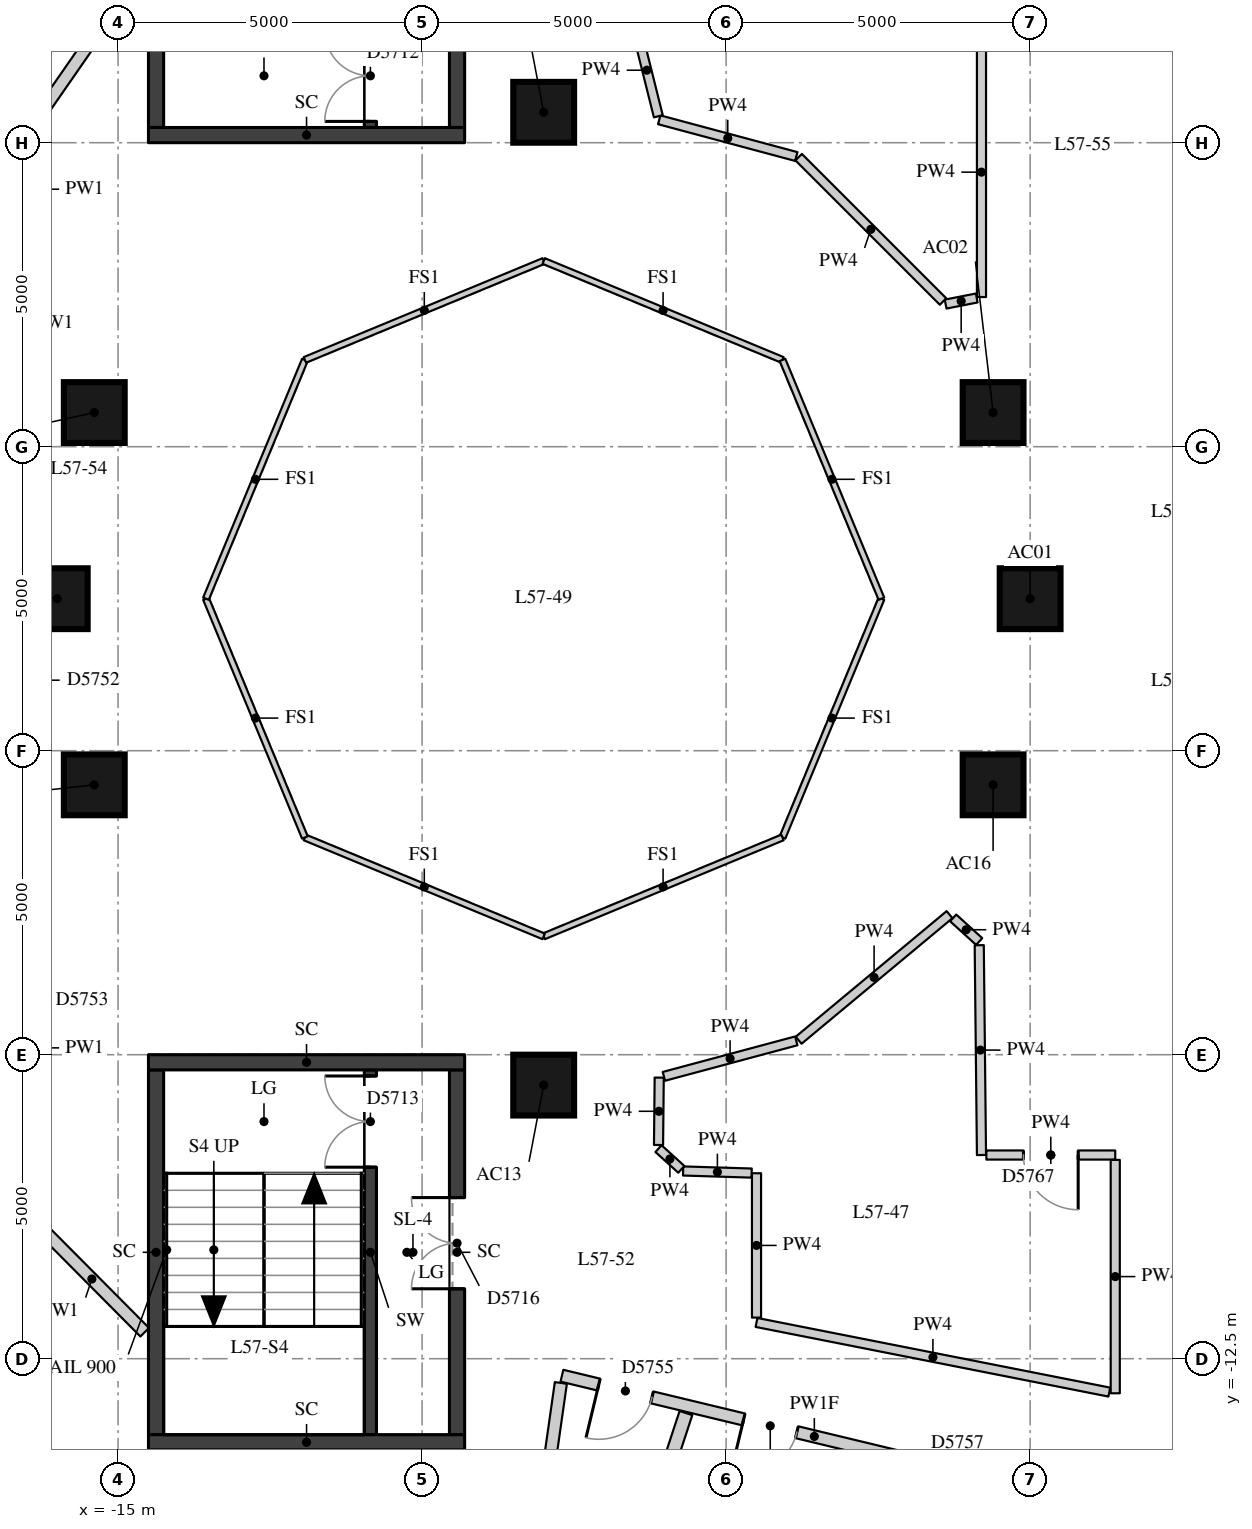
"""IFC4 building model, lengths in metres.
Left out: names, types, materials, properties, quantities, classifications, styles, units other than length and angle.
Written with IfcOpenShell. Run it as: python <this file> out.ifc"""

import sys

from ifc_helpers import new_model, si_unit, direction, frame, frame_2d, origin, origin_2d, place, context, subcontext, project, spatial, rectangle, extrude, element, fill, save


model = new_model("IFC4")
c1 = context("Model", 3, precision=1e-05, world=origin(), true_north=direction((0.0, 1.0)))
c2 = subcontext(c1, "Body", "Model", "MODEL_VIEW")
j1 = project(units=[si_unit("LENGTHUNIT", "METRE"), si_unit("PLANEANGLEUNIT", "RADIAN")], contexts=[c1])
p1 = place(None, origin())
s1 = spatial("IfcSite", under=j1, at=p1, CompositionType="ELEMENT")
p2 = place(p1, origin())
s2 = spatial("IfcBuilding", under=s1, at=p2, CompositionType="ELEMENT")
p3 = place(p2, frame((0.0, 0.0, 202.4)))
s3 = spatial("IfcBuildingStorey", under=s2, at=p3, CompositionType="ELEMENT", Elevation=202.4)
for number, where, z_axis, x_axis in (
    (1, (0.0, 0.0, 0.0), (0.0, 0.0, 1.0), (1.0, 0.0, 0.0)),
    (2, (-0.609, 3.062, 0.0), (0.0, 0.0, 1.0), (1.0, 0.0, 0.0)),
    (3, (-8.0, 8.0, 0.0), (0.0, 0.0, 1.0), (1.0, 0.0, 0.0)),
    (4, (-15.391, 3.062, 0.0), (0.0, 0.0, 1.0), (1.0, 0.0, 0.0)),
    (5, (-16.0, 0.0, 0.0), (0.0, 0.0, 1.0), (1.0, 0.0, 0.0)),
    (6, (-15.391, -3.062, 0.0), (0.0, 0.0, 1.0), (1.0, 0.0, 0.0)),
    (7, (-8.0, -8.0, 0.0), (0.0, 0.0, 1.0), (1.0, 0.0, 0.0)),
    (8, (-0.609, -3.062, 0.0), (0.0, 0.0, 1.0), (1.0, 0.0, 0.0)),
):
    element("IfcColumn", number, at=place(p3, frame(where, z_axis=z_axis, x_axis=x_axis)), inside=s3, PredefinedType="COLUMN", context=c2, shape_type="SweptSolid", body=[
        extrude(rectangle(XDim=1.0, YDim=1.0, at=origin_2d()), origin(), (0.0, 0.0, 1.0), 3.3),
    ])
p4 = place(p3, frame((-10.85, 7.75, 0.0), z_axis=(0.0, 0.0, 1.0), x_axis=(0.0, 1.0, 0.0)))
e9 = element("IfcWall", 9, at=p4, inside=s3, PredefinedType="SHEAR", context=c2, shape_type="SweptSolid", body=[
    extrude(rectangle(XDim=6.0, YDim=0.2, at=frame_2d((3.0, 0.0))), origin(), (0.0, 0.0, 1.0), 3.02),
])
p5 = place(p4, frame((0.1, 0.0, 0.0)))
e10 = element("IfcOpeningElement", 10, at=p5, cuts=e9, PredefinedType="OPENING", context=c2, shape_type="SweptSolid", body=[
    extrude(rectangle(XDim=1.5, YDim=2.1, at=frame_2d((0.75, 1.05))), frame((0.0, 0.11, 0.0), z_axis=(0.0, -1.0, 0.0), x_axis=(1.0, 0.0, 0.0)), (0.0, 0.0, 1.0), 0.22),
])
p6 = place(p3, frame((-10.85, -13.75, 0.0), z_axis=(0.0, 0.0, 1.0), x_axis=(0.0, 1.0, 0.0)))
e11 = element("IfcWall", 11, at=p6, inside=s3, PredefinedType="SHEAR", context=c2, shape_type="SweptSolid", body=[
    extrude(rectangle(XDim=6.0, YDim=0.2, at=frame_2d((3.0, 0.0))), origin(), (0.0, 0.0, 1.0), 3.02),
])
p7 = place(p6, frame((4.4, 0.0, 0.0)))
e12 = element("IfcOpeningElement", 12, at=p7, cuts=e11, PredefinedType="OPENING", context=c2, shape_type="SweptSolid", body=[
    extrude(rectangle(XDim=1.5, YDim=2.1, at=frame_2d((0.75, 1.05))), frame((0.0, 0.11, 0.0), z_axis=(0.0, -1.0, 0.0), x_axis=(1.0, 0.0, 0.0)), (0.0, 0.0, 1.0), 0.22),
])
p8 = place(p3, frame((-14.375, 7.75, -0.28), z_axis=(0.0, 0.0, 1.0), x_axis=(0.0, 1.0, 0.0)))
e13 = element("IfcWall", 13, at=p8, inside=s3, PredefinedType="SHEAR", context=c2, shape_type="SweptSolid", body=[
    extrude(rectangle(XDim=6.0, YDim=0.25, at=frame_2d((3.0, 0.0))), origin(), (0.0, 0.0, 1.0), 3.3),
])
p9 = place(p3, frame((-9.425, 7.75, -0.28), z_axis=(0.0, 0.0, 1.0), x_axis=(0.0, 1.0, 0.0)))
e14 = element("IfcWall", 14, at=p9, inside=s3, PredefinedType="SHEAR", context=c2, shape_type="SweptSolid", body=[
    extrude(rectangle(XDim=6.0, YDim=0.25, at=frame_2d((3.0, 0.0))), origin(), (0.0, 0.0, 1.0), 3.3),
])
p10 = place(p9, frame((2.1, 0.0, 0.28)))
e15 = element("IfcOpeningElement", 15, at=p10, cuts=e14, PredefinedType="OPENING", context=c2, shape_type="SweptSolid", body=[
    extrude(rectangle(XDim=1.5, YDim=2.1, at=frame_2d((0.75, 1.05))), frame((0.0, 0.135, 0.0), z_axis=(0.0, -1.0, 0.0), x_axis=(1.0, 0.0, 0.0)), (0.0, 0.0, 1.0), 0.27),
])
p11 = place(p3, frame((-14.5, 7.625, -0.28), z_axis=(0.0, 0.0, 1.0), x_axis=(1.0, 0.0, 0.0)))
e16 = element("IfcWall", 16, at=p11, inside=s3, PredefinedType="SHEAR", context=c2, shape_type="SweptSolid", body=[
    extrude(rectangle(XDim=5.2, YDim=0.25, at=frame_2d((2.6, 0.0))), origin(), (0.0, 0.0, 1.0), 3.3),
])
p12 = place(p3, frame((-14.375, -13.75, -0.28), z_axis=(0.0, 0.0, 1.0), x_axis=(0.0, 1.0, 0.0)))
e17 = element("IfcWall", 17, at=p12, inside=s3, PredefinedType="SHEAR", context=c2, shape_type="SweptSolid", body=[
    extrude(rectangle(XDim=6.0, YDim=0.25, at=frame_2d((3.0, 0.0))), origin(), (0.0, 0.0, 1.0), 3.3),
])
p13 = place(p3, frame((-9.425, -13.75, -0.28), z_axis=(0.0, 0.0, 1.0), x_axis=(0.0, 1.0, 0.0)))
e18 = element("IfcWall", 18, at=p13, inside=s3, PredefinedType="SHEAR", context=c2, shape_type="SweptSolid", body=[
    extrude(rectangle(XDim=6.0, YDim=0.25, at=frame_2d((3.0, 0.0))), origin(), (0.0, 0.0, 1.0), 3.3),
])
p14 = place(p13, frame((2.4, 0.0, 0.28)))
e19 = element("IfcOpeningElement", 19, at=p14, cuts=e18, PredefinedType="OPENING", context=c2, shape_type="SweptSolid", body=[
    extrude(rectangle(XDim=1.5, YDim=2.1, at=frame_2d((0.75, 1.05))), frame((0.0, 0.135, 0.0), z_axis=(0.0, -1.0, 0.0), x_axis=(1.0, 0.0, 0.0)), (0.0, 0.0, 1.0), 0.27),
])
for number, where, z_axis, x_axis in (
    (20, (-14.5, -7.625, -0.28), (0.0, 0.0, 1.0), (1.0, 0.0, 0.0)),
    (21, (-14.5, -13.875, -0.28), (0.0, 0.0, 1.0), (1.0, 0.0, 0.0)),
):
    element("IfcWall", number, at=place(p3, frame(where, z_axis=z_axis, x_axis=x_axis)), inside=s3, PredefinedType="SHEAR", context=c2, shape_type="SweptSolid", body=[
        extrude(rectangle(XDim=5.2, YDim=0.25, at=frame_2d((2.6, 0.0))), origin(), (0.0, 0.0, 1.0), 3.3),
    ])
p15 = place(p3, frame((7.089, -13.786, 0.0), z_axis=(0.0, 0.0, 1.0), x_axis=(-0.987636270411, -0.156762869867, 0.0)))
e22 = element("IfcWall", 22, at=p15, inside=s3, PredefinedType="PARTITIONING", context=c2, shape_type="SweptSolid", body=[
    extrude(rectangle(XDim=6.469, YDim=0.2, at=frame_2d((3.235, 0.0))), origin(), (0.0, 0.0, 1.0), 2.42),
])
p16 = place(p15, frame((5.016, 0.0, 0.0)))
e23 = element("IfcOpeningElement", 23, at=p16, cuts=e22, PredefinedType="OPENING", context=c2, shape_type="SweptSolid", body=[
    extrude(rectangle(XDim=1.1, YDim=2.1, at=frame_2d((0.55, 1.05))), frame((0.0, 0.11, 0.0), z_axis=(0.0, -1.0, 0.0), x_axis=(1.0, 0.0, 0.0)), (0.0, 0.0, 1.0), 0.22),
])
p17 = place(p3, frame((0.602, -14.777, 0.0), z_axis=(0.0, 0.0, 1.0), x_axis=(-0.972266752798, 0.23387467029, 0.0)))
e24 = element("IfcWall", 24, at=p17, inside=s3, PredefinedType="PARTITIONING", context=c2, shape_type="SweptSolid", body=[
    extrude(rectangle(XDim=8.539, YDim=0.2, at=frame_2d((4.27, 0.0))), origin(), (0.0, 0.0, 1.0), 2.42),
])
p18 = place(p17, frame((7.016, 0.0, 0.0)))
e25 = element("IfcOpeningElement", 25, at=p18, cuts=e24, PredefinedType="OPENING", context=c2, shape_type="SweptSolid", body=[
    extrude(rectangle(XDim=0.9, YDim=2.1, at=frame_2d((0.45, 1.05))), frame((0.0, 0.11, 0.0), z_axis=(0.0, -1.0, 0.0), x_axis=(1.0, 0.0, 0.0)), (0.0, 0.0, 1.0), 0.22),
])
p19 = place(p17, frame((4.565, 0.0, 0.0)))
e26 = element("IfcOpeningElement", 26, at=p19, cuts=e24, PredefinedType="OPENING", context=c2, shape_type="SweptSolid", body=[
    extrude(rectangle(XDim=0.9, YDim=2.1, at=frame_2d((0.45, 1.05))), frame((0.0, 0.11, 0.0), z_axis=(0.0, -1.0, 0.0), x_axis=(1.0, 0.0, 0.0)), (0.0, 0.0, 1.0), 0.22),
])
p20 = place(p17, frame((1.78, 0.0, 0.0)))
e27 = element("IfcOpeningElement", 27, at=p20, cuts=e24, PredefinedType="OPENING", context=c2, shape_type="SweptSolid", body=[
    extrude(rectangle(XDim=0.9, YDim=2.1, at=frame_2d((0.45, 1.05))), frame((0.0, 0.11, 0.0), z_axis=(0.0, -1.0, 0.0), x_axis=(1.0, 0.0, 0.0)), (0.0, 0.0, 1.0), 0.22),
])
p21 = place(p3, frame((-7.718, -12.898, 0.0), z_axis=(0.0, 0.0, 1.0), x_axis=(-0.141269756138, -0.989971138974, 0.0)))
e28 = element("IfcWall", 28, at=p21, inside=s3, PredefinedType="PARTITIONING", context=c2, shape_type="SweptSolid", body=[
    extrude(rectangle(XDim=2.931, YDim=0.2, at=frame_2d((1.465, 0.0))), origin(), (0.0, 0.0, 1.0), 3.02),
])
p22 = place(p3, frame((-14.562, -12.064, 0.0), z_axis=(0.0, 0.0, 1.0), x_axis=(-0.704826289083, 0.709379942074, 0.0)))
e29 = element("IfcWall", 29, at=p22, inside=s3, PredefinedType="PARTITIONING", context=c2, shape_type="SweptSolid", body=[
    extrude(rectangle(XDim=2.466, YDim=0.2, at=frame_2d((1.233, 0.0))), origin(), (0.0, 0.0, 1.0), 3.02),
])
p23 = place(p3, frame((-16.266, 7.989, 0.0), z_axis=(0.0, 0.0, 1.0), x_axis=(0.569860411146, 0.821741511552, 0.0)))
e30 = element("IfcWall", 30, at=p23, inside=s3, PredefinedType="PARTITIONING", context=c2, shape_type="SweptSolid", body=[
    extrude(rectangle(XDim=2.966, YDim=0.2, at=frame_2d((1.483, 0.0))), origin(), (0.0, 0.0, 1.0), 3.02),
])
p24 = place(p3, frame((-0.8, 9.07, 0.0), z_axis=(0.0, 0.0, 1.0), x_axis=(0.0, -1.0, 0.0)))
e31 = element("IfcWall", 31, at=p24, inside=s3, PredefinedType="PARTITIONING", context=c2, shape_type="SweptSolid", body=[
    extrude(rectangle(XDim=4.108, YDim=0.15, at=frame_2d((2.054, 0.0))), origin(), (0.0, 0.0, 1.0), 3.02),
])
p25 = place(p3, frame((-0.878, 4.946, 0.0), z_axis=(0.0, 0.0, 1.0), x_axis=(-0.981223514921, -0.192874087857, 0.0)))
e32 = element("IfcWall", 32, at=p25, inside=s3, PredefinedType="PARTITIONING", context=c2, shape_type="SweptSolid", body=[
    extrude(rectangle(XDim=0.521, YDim=0.15, at=frame_2d((0.261, 0.0))), origin(), (0.0, 0.0, 1.0), 3.02),
])
p26 = place(p3, frame((-1.432, 4.888, 0.0), z_axis=(0.0, 0.0, 1.0), x_axis=(-0.70714312975, 0.707070430754, 0.0)))
e33 = element("IfcWall", 33, at=p26, inside=s3, PredefinedType="PARTITIONING", context=c2, shape_type="SweptSolid", body=[
    extrude(rectangle(XDim=3.358, YDim=0.15, at=frame_2d((1.679, 0.0))), origin(), (0.0, 0.0, 1.0), 3.02),
])
p27 = place(p3, frame((-3.846, 7.272, 0.0), z_axis=(0.0, 0.0, 1.0), x_axis=(-0.965906023197, 0.258892939941, 0.0)))
e34 = element("IfcWall", 34, at=p27, inside=s3, PredefinedType="PARTITIONING", context=c2, shape_type="SweptSolid", body=[
    extrude(rectangle(XDim=2.334, YDim=0.15, at=frame_2d((1.167, 0.0))), origin(), (0.0, 0.0, 1.0), 3.02),
])
p28 = place(p3, frame((-6.115, 7.935, 0.0), z_axis=(0.0, 0.0, 1.0), x_axis=(-0.242425292239, 0.970170076679, 0.0)))
e35 = element("IfcWall", 35, at=p28, inside=s3, PredefinedType="PARTITIONING", context=c2, shape_type="SweptSolid", body=[
    extrude(rectangle(XDim=1.562, YDim=0.15, at=frame_2d((0.781, 0.0))), origin(), (0.0, 0.0, 1.0), 3.02),
])
p29 = place(p3, frame((-3.807, -7.262, 0.0), z_axis=(0.0, 0.0, 1.0), x_axis=(0.768654933145, 0.639663656739, 0.0)))
e36 = element("IfcWall", 36, at=p29, inside=s3, PredefinedType="PARTITIONING", context=c2, shape_type="SweptSolid", body=[
    extrude(rectangle(XDim=3.229, YDim=0.15, at=frame_2d((1.615, 0.0))), origin(), (0.0, 0.0, 1.0), 3.02),
])
p30 = place(p3, frame((-1.266, -5.25, 0.0), z_axis=(0.0, 0.0, 1.0), x_axis=(0.740704364941, -0.671831112525, 0.0)))
e37 = element("IfcWall", 37, at=p30, inside=s3, PredefinedType="PARTITIONING", context=c2, shape_type="SweptSolid", body=[
    extrude(rectangle(XDim=0.578, YDim=0.15, at=frame_2d((0.289, 0.0))), origin(), (0.0, 0.0, 1.0), 3.02),
])
p31 = place(p3, frame((-0.837, -5.699, 0.0), z_axis=(0.0, 0.0, 1.0), x_axis=(0.010681337428, -0.999942952888, 0.0)))
e38 = element("IfcWall", 38, at=p31, inside=s3, PredefinedType="PARTITIONING", context=c2, shape_type="SweptSolid", body=[
    extrude(rectangle(XDim=3.451, YDim=0.15, at=frame_2d((1.726, 0.0))), origin(), (0.0, 0.0, 1.0), 3.02),
])
p32 = place(p3, frame((-0.72, -9.15, 0.0), z_axis=(0.0, 0.0, 1.0), x_axis=(1.0, 0.0, 0.0)))
e39 = element("IfcWall", 39, at=p32, inside=s3, PredefinedType="PARTITIONING", context=c2, shape_type="SweptSolid", body=[
    extrude(rectangle(XDim=2.12, YDim=0.15, at=frame_2d((1.06, 0.0))), origin(), (0.0, 0.0, 1.0), 3.02),
])
p33 = place(p32, frame((0.61, 0.0, 0.0)))
e40 = element("IfcOpeningElement", 40, at=p33, cuts=e39, PredefinedType="OPENING", context=c2, shape_type="SweptSolid", body=[
    extrude(rectangle(XDim=0.9, YDim=2.1, at=frame_2d((0.45, 1.05))), frame((0.0, 0.085, 0.0), z_axis=(0.0, -1.0, 0.0), x_axis=(1.0, 0.0, 0.0)), (0.0, 0.0, 1.0), 0.17),
])
p34 = place(p3, frame((1.4, -9.23, 0.0), z_axis=(0.0, 0.0, 1.0), x_axis=(0.0, -1.0, 0.0)))
e41 = element("IfcWall", 41, at=p34, inside=s3, PredefinedType="PARTITIONING", context=c2, shape_type="SweptSolid", body=[
    extrude(rectangle(XDim=3.839, YDim=0.15, at=frame_2d((1.919, 0.0))), origin(), (0.0, 0.0, 1.0), 3.02),
])
p35 = place(p3, frame((1.302, -13.049, 0.0), z_axis=(0.0, 0.0, 1.0), x_axis=(-0.981063502149, 0.193686356647, 0.0)))
e42 = element("IfcWall", 42, at=p35, inside=s3, PredefinedType="PARTITIONING", context=c2, shape_type="SweptSolid", body=[
    extrude(rectangle(XDim=5.914, YDim=0.15, at=frame_2d((2.957, 0.0))), origin(), (0.0, 0.0, 1.0), 3.02),
])
p36 = place(p3, frame((-4.5, -11.824, 0.0), z_axis=(0.0, 0.0, 1.0), x_axis=(0.0, 1.0, 0.0)))
e43 = element("IfcWall", 43, at=p36, inside=s3, PredefinedType="PARTITIONING", context=c2, shape_type="SweptSolid", body=[
    extrude(rectangle(XDim=2.374, YDim=0.15, at=frame_2d((1.187, 0.0))), origin(), (0.0, 0.0, 1.0), 3.02),
])
p37 = place(p3, frame((-4.58, -9.447, 0.0), z_axis=(0.0, 0.0, 1.0), x_axis=(-0.999526758156, 0.030761334993, 0.0)))
e44 = element("IfcWall", 44, at=p37, inside=s3, PredefinedType="PARTITIONING", context=c2, shape_type="SweptSolid", body=[
    extrude(rectangle(XDim=1.127, YDim=0.15, at=frame_2d((0.563, 0.0))), origin(), (0.0, 0.0, 1.0), 3.02),
])
p38 = place(p3, frame((-5.736, -9.385, 0.0), z_axis=(0.0, 0.0, 1.0), x_axis=(-0.740919573429, 0.671593765389, 0.0)))
e45 = element("IfcWall", 45, at=p38, inside=s3, PredefinedType="PARTITIONING", context=c2, shape_type="SweptSolid", body=[
    extrude(rectangle(XDim=0.507, YDim=0.15, at=frame_2d((0.253, 0.0))), origin(), (0.0, 0.0, 1.0), 3.02),
])
p39 = place(p3, frame((-6.111, -8.985, 0.0), z_axis=(0.0, 0.0, 1.0), x_axis=(0.010133870444, 0.999948651017, 0.0)))
e46 = element("IfcWall", 46, at=p39, inside=s3, PredefinedType="PARTITIONING", context=c2, shape_type="SweptSolid", body=[
    extrude(rectangle(XDim=1.108, YDim=0.15, at=frame_2d((0.554, 0.0))), origin(), (0.0, 0.0, 1.0), 3.02),
])
p40 = place(p3, frame((-6.023, -7.856, 0.0), z_axis=(0.0, 0.0, 1.0), x_axis=(0.965887119847, 0.25896345633, 0.0)))
e47 = element("IfcWall", 47, at=p40, inside=s3, PredefinedType="PARTITIONING", context=c2, shape_type="SweptSolid", body=[
    extrude(rectangle(XDim=2.254, YDim=0.15, at=frame_2d((1.127, 0.0))), origin(), (0.0, 0.0, 1.0), 3.02),
])
p41 = place(p3, frame((-7.907, -20.235, 0.0), z_axis=(0.0, 0.0, 1.0), x_axis=(0.312013837279, 0.950077557543, 0.0)))
e48 = element("IfcWall", 48, at=p41, inside=s3, PredefinedType="PARTITIONING", context=c2, shape_type="SweptSolid", body=[
    extrude(rectangle(XDim=7.201, YDim=0.22, at=frame_2d((3.601, 0.0))), origin(), (0.0, 0.0, 1.0), 3.02),
])
for number, where, z_axis, x_axis in (
    (49, (-2.446, 0.0, 0.0), (0.0, 0.0, 1.0), (-0.383, -0.924, 0.0)),
    (50, (-4.073, -3.927, 0.0), (0.0, 0.0, 1.0), (-0.924, -0.383, 0.0)),
    (51, (-8.0, -5.554, 0.0), (0.0, 0.0, 1.0), (-0.924, 0.383, 0.0)),
    (52, (-11.927, -3.927, 0.0), (0.0, 0.0, 1.0), (-0.383, 0.924, 0.0)),
    (53, (-13.554, 0.0, 0.0), (0.0, 0.0, 1.0), (0.383, 0.924, 0.0)),
    (54, (-11.927, 3.927, 0.0), (0.0, 0.0, 1.0), (0.924, 0.383, 0.0)),
    (55, (-8.0, 5.554, 0.0), (0.0, 0.0, 1.0), (0.924, -0.383, 0.0)),
    (56, (-4.073, 3.927, 0.0), (0.0, 0.0, 1.0), (0.383, -0.924, 0.0)),
):
    element("IfcWall", number, at=place(p3, frame(where, z_axis=z_axis, x_axis=x_axis)), inside=s3, PredefinedType="PARTITIONING", context=c2, shape_type="SweptSolid", body=[
        extrude(rectangle(XDim=4.251, YDim=0.1, at=frame_2d((2.125, 0.0))), origin(), (0.0, 0.0, 1.0), 3.02),
    ])
p42 = place(p5, origin())
e57 = element("IfcDoor", 57, at=p42, inside=s3, OperationType="DOUBLE_DOOR_SINGLE_SWING", PredefinedType="DOOR", context=c2, shape_type="SweptSolid", body=[
    extrude(rectangle(XDim=1.5, YDim=2.1, at=frame_2d((0.75, 1.05))), frame((0.0, 0.025, 0.0), z_axis=(0.0, -1.0, 0.0), x_axis=(1.0, 0.0, 0.0)), (0.0, 0.0, 1.0), 0.05),
])
fill(e10, e57)
p43 = place(p7, origin())
e58 = element("IfcDoor", 58, at=p43, inside=s3, OperationType="DOUBLE_DOOR_SINGLE_SWING", PredefinedType="DOOR", context=c2, shape_type="SweptSolid", body=[
    extrude(rectangle(XDim=1.5, YDim=2.1, at=frame_2d((0.75, 1.05))), frame((0.0, 0.025, 0.0), z_axis=(0.0, -1.0, 0.0), x_axis=(1.0, 0.0, 0.0)), (0.0, 0.0, 1.0), 0.05),
])
fill(e12, e58)
p44 = place(p14, origin())
e59 = element("IfcDoor", 59, at=p44, inside=s3, OperationType="DOUBLE_DOOR_SINGLE_SWING", PredefinedType="DOOR", context=c2, shape_type="SweptSolid", body=[
    extrude(rectangle(XDim=1.5, YDim=2.1, at=frame_2d((0.75, 1.05))), frame((0.0, 0.025, 0.0), z_axis=(0.0, -1.0, 0.0), x_axis=(1.0, 0.0, 0.0)), (0.0, 0.0, 1.0), 0.05),
])
fill(e19, e59)
p45 = place(p18, origin())
e60 = element("IfcDoor", 60, at=p45, inside=s3, OperationType="SINGLE_SWING_RIGHT", PredefinedType="DOOR", context=c2, shape_type="SweptSolid", body=[
    extrude(rectangle(XDim=0.9, YDim=2.1, at=frame_2d((0.45, 1.05))), frame((0.0, 0.025, 0.0), z_axis=(0.0, -1.0, 0.0), x_axis=(1.0, 0.0, 0.0)), (0.0, 0.0, 1.0), 0.05),
])
fill(e25, e60)
p46 = place(p19, origin())
e61 = element("IfcDoor", 61, at=p46, inside=s3, OperationType="SINGLE_SWING_RIGHT", PredefinedType="DOOR", context=c2, shape_type="SweptSolid", body=[
    extrude(rectangle(XDim=0.9, YDim=2.1, at=frame_2d((0.45, 1.05))), frame((0.0, 0.025, 0.0), z_axis=(0.0, -1.0, 0.0), x_axis=(1.0, 0.0, 0.0)), (0.0, 0.0, 1.0), 0.05),
])
fill(e26, e61)
p47 = place(p33, origin())
e62 = element("IfcDoor", 62, at=p47, inside=s3, OperationType="SINGLE_SWING_LEFT", PredefinedType="DOOR", context=c2, shape_type="SweptSolid", body=[
    extrude(rectangle(XDim=0.9, YDim=2.1, at=frame_2d((0.45, 1.05))), frame((0.0, 0.025, 0.0), z_axis=(0.0, -1.0, 0.0), x_axis=(1.0, 0.0, 0.0)), (0.0, 0.0, 1.0), 0.05),
])
fill(e40, e62)
save(model, sys.argv[1])
